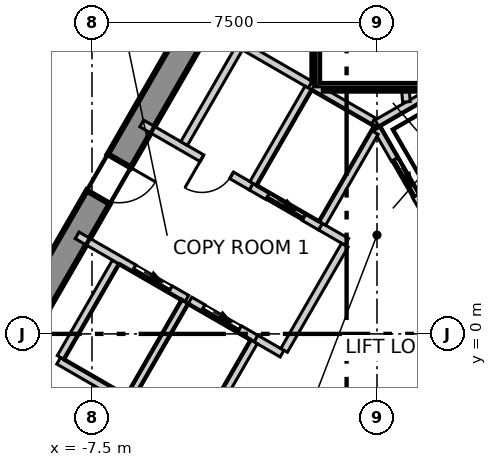
"""IFC4 building model, lengths in metres.
Left out: names, types, materials, properties, quantities, classifications, styles, units other than length and angle.
Written with IfcOpenShell. Run it as: python <this file> out.ifc"""

import sys

from ifc_helpers import new_model, si_unit, direction, frame, frame_2d, origin, place, context, subcontext, project, spatial, polyline, rectangle, outline, extrude, element, fill, save


model = new_model("IFC4")
c1 = context("Model", 3, precision=1e-05, world=origin(), true_north=direction((0.0, 1.0)))
c2 = subcontext(c1, "Body", "Model", "MODEL_VIEW")
j1 = project(units=[si_unit("LENGTHUNIT", "METRE"), si_unit("PLANEANGLEUNIT", "RADIAN")], contexts=[c1])
p1 = place(None, origin())
s1 = spatial("IfcSite", under=j1, at=p1, CompositionType="ELEMENT")
p2 = place(p1, origin())
s2 = spatial("IfcBuilding", under=s1, at=p2, CompositionType="ELEMENT")
p3 = place(p2, frame((0.0, 0.0, 215.3)))
s3 = spatial("IfcBuildingStorey", under=s2, at=p3, CompositionType="ELEMENT", Elevation=215.3)
p4 = place(p3, frame((-1.703, 13.35, -0.3), z_axis=(0.0, 0.0, 1.0), x_axis=(-0.500011533395, -0.866018744874, 0.0)))
e1 = element("IfcWall", 1, at=p4, inside=s3, PredefinedType="SHEAR", context=c2, shape_type="SweptSolid", body=[
    extrude(outline(polyline([(-0.202, -0.35), (1.782, -0.35), (3.766, -0.35), (5.75, -0.35), (7.734, -0.35), (9.718, -0.35), (11.702, -0.35), (13.686, -0.35), (15.67, -0.35), (17.654, -0.35), (19.638, -0.35), (21.622, -0.35), (21.218, 0.35), (19.307, 0.35), (17.397, 0.35), (15.486, 0.35), (13.576, 0.35), (11.665, 0.35), (9.755, 0.35), (7.844, 0.35), (5.934, 0.35), (4.023, 0.35), (2.113, 0.35), (0.202, 0.35), (-0.202, -0.35)])), origin(), (0.0, 0.0, 1.0), 4.0),
])
p5 = place(p4, frame((10.16, 0.0, 0.3)))
e2 = element("IfcOpeningElement", 2, at=p5, cuts=e1, PredefinedType="OPENING", context=c2, shape_type="SweptSolid", body=[
    extrude(rectangle(XDim=1.1, YDim=2.1, at=frame_2d((0.55, 1.05))), frame((0.0, 0.36, 0.0), z_axis=(0.0, -1.0, 0.0), x_axis=(1.0, 0.0, 0.0)), (0.0, 0.0, 1.0), 0.72),
])
p6 = place(p4, frame((16.465, 0.0, 0.3)))
e3 = element("IfcOpeningElement", 3, at=p6, cuts=e1, PredefinedType="OPENING", context=c2, shape_type="SweptSolid", body=[
    extrude(rectangle(XDim=0.9, YDim=2.1, at=frame_2d((0.45, 1.05))), frame((0.0, 0.36, 0.0), z_axis=(0.0, -1.0, 0.0), x_axis=(1.0, 0.0, 0.0)), (0.0, 0.0, 1.0), 0.72),
])
p7 = place(p4, frame((4.005, 0.0, 0.3)))
e4 = element("IfcOpeningElement", 4, at=p7, cuts=e1, PredefinedType="OPENING", context=c2, shape_type="SweptSolid", body=[
    extrude(rectangle(XDim=1.0, YDim=2.1, at=frame_2d((0.5, 1.05))), frame((0.0, 0.36, 0.0), z_axis=(0.0, -1.0, 0.0), x_axis=(1.0, 0.0, 0.0)), (0.0, 0.0, 1.0), 0.72),
])
p8 = place(p3, frame((-2.778, 31.008, 0.0), z_axis=(0.0, 0.0, 1.0), x_axis=(-0.499999612413, -0.866025627558, 0.0)))
e5 = element("IfcWall", 5, at=p8, inside=s3, PredefinedType="ELEMENTEDWALL", context=c2, shape_type="SweptSolid", body=[
    extrude(rectangle(XDim=50.91, YDim=0.2, at=frame_2d((25.455, 0.0))), origin(), (0.0, 0.0, 1.0), 3.7),
])
p9 = place(p8, frame((2.223, 0.0, 0.9)))
e6 = element("IfcOpeningElement", 6, at=p9, cuts=e5, PredefinedType="OPENING", context=c2, shape_type="SweptSolid", body=[
    extrude(rectangle(XDim=4.2, YDim=2.5, at=frame_2d((2.1, 1.25))), frame((0.0, 0.11, 0.0), z_axis=(0.0, -1.0, 0.0), x_axis=(1.0, 0.0, 0.0)), (0.0, 0.0, 1.0), 0.22),
])
p10 = place(p8, frame((8.263, 0.0, 0.9)))
e7 = element("IfcOpeningElement", 7, at=p10, cuts=e5, PredefinedType="OPENING", context=c2, shape_type="SweptSolid", body=[
    extrude(rectangle(XDim=4.2, YDim=2.5, at=frame_2d((2.1, 1.25))), frame((0.0, 0.11, 0.0), z_axis=(0.0, -1.0, 0.0), x_axis=(1.0, 0.0, 0.0)), (0.0, 0.0, 1.0), 0.22),
])
p11 = place(p8, frame((14.304, 0.0, 0.9)))
e8 = element("IfcOpeningElement", 8, at=p11, cuts=e5, PredefinedType="OPENING", context=c2, shape_type="SweptSolid", body=[
    extrude(rectangle(XDim=4.2, YDim=2.5, at=frame_2d((2.1, 1.25))), frame((0.0, 0.11, 0.0), z_axis=(0.0, -1.0, 0.0), x_axis=(1.0, 0.0, 0.0)), (0.0, 0.0, 1.0), 0.22),
])
p12 = place(p8, frame((20.344, 0.0, 0.9)))
e9 = element("IfcOpeningElement", 9, at=p12, cuts=e5, PredefinedType="OPENING", context=c2, shape_type="SweptSolid", body=[
    extrude(rectangle(XDim=4.2, YDim=2.5, at=frame_2d((2.1, 1.25))), frame((0.0, 0.11, 0.0), z_axis=(0.0, -1.0, 0.0), x_axis=(1.0, 0.0, 0.0)), (0.0, 0.0, 1.0), 0.22),
])
p13 = place(p8, frame((26.385, 0.0, 0.9)))
e10 = element("IfcOpeningElement", 10, at=p13, cuts=e5, PredefinedType="OPENING", context=c2, shape_type="SweptSolid", body=[
    extrude(rectangle(XDim=4.2, YDim=2.5, at=frame_2d((2.1, 1.25))), frame((0.0, 0.11, 0.0), z_axis=(0.0, -1.0, 0.0), x_axis=(1.0, 0.0, 0.0)), (0.0, 0.0, 1.0), 0.22),
])
p14 = place(p8, frame((32.425, 0.0, 0.9)))
e11 = element("IfcOpeningElement", 11, at=p14, cuts=e5, PredefinedType="OPENING", context=c2, shape_type="SweptSolid", body=[
    extrude(rectangle(XDim=4.2, YDim=2.5, at=frame_2d((2.1, 1.25))), frame((0.0, 0.11, 0.0), z_axis=(0.0, -1.0, 0.0), x_axis=(1.0, 0.0, 0.0)), (0.0, 0.0, 1.0), 0.22),
])
p15 = place(p8, frame((38.466, 0.0, 0.9)))
e12 = element("IfcOpeningElement", 12, at=p15, cuts=e5, PredefinedType="OPENING", context=c2, shape_type="SweptSolid", body=[
    extrude(rectangle(XDim=4.2, YDim=2.5, at=frame_2d((2.1, 1.25))), frame((0.0, 0.11, 0.0), z_axis=(0.0, -1.0, 0.0), x_axis=(1.0, 0.0, 0.0)), (0.0, 0.0, 1.0), 0.22),
])
p16 = place(p8, frame((44.506, 0.0, 0.9)))
e13 = element("IfcOpeningElement", 13, at=p16, cuts=e5, PredefinedType="OPENING", context=c2, shape_type="SweptSolid", body=[
    extrude(rectangle(XDim=4.2, YDim=2.5, at=frame_2d((2.1, 1.25))), frame((0.0, 0.11, 0.0), z_axis=(0.0, -1.0, 0.0), x_axis=(1.0, 0.0, 0.0)), (0.0, 0.0, 1.0), 0.22),
])
p17 = place(p3, frame((-20.883, -11.97, 0.0), z_axis=(0.0, 0.0, 1.0), x_axis=(0.500006150555, 0.866021852731, 0.0)))
e14 = element("IfcWall", 14, at=p17, inside=s3, PredefinedType="PARTITIONING", context=c2, shape_type="SweptSolid", body=[
    extrude(rectangle(XDim=41.766, YDim=0.15, at=frame_2d((20.883, 0.0))), origin(), (0.0, 0.0, 1.0), 3.7),
])
p18 = place(p17, frame((36.816, 0.0, 0.0)))
e15 = element("IfcOpeningElement", 15, at=p18, cuts=e14, PredefinedType="OPENING", context=c2, shape_type="SweptSolid", body=[
    extrude(rectangle(XDim=1.1, YDim=2.1, at=frame_2d((0.55, 1.05))), frame((0.0, 0.085, 0.0), z_axis=(0.0, -1.0, 0.0), x_axis=(1.0, 0.0, 0.0)), (0.0, 0.0, 1.0), 0.17),
])
p19 = place(p17, frame((23.939, 0.0, 0.0)))
e16 = element("IfcOpeningElement", 16, at=p19, cuts=e14, PredefinedType="OPENING", context=c2, shape_type="SweptSolid", body=[
    extrude(rectangle(XDim=1.1, YDim=2.1, at=frame_2d((0.55, 1.05))), frame((0.0, 0.085, 0.0), z_axis=(0.0, -1.0, 0.0), x_axis=(1.0, 0.0, 0.0)), (0.0, 0.0, 1.0), 0.17),
])
p20 = place(p17, frame((31.139, 0.0, 0.0)))
e17 = element("IfcOpeningElement", 17, at=p20, cuts=e14, PredefinedType="OPENING", context=c2, shape_type="SweptSolid", body=[
    extrude(rectangle(XDim=0.9, YDim=2.1, at=frame_2d((0.45, 1.05))), frame((0.0, 0.085, 0.0), z_axis=(0.0, -1.0, 0.0), x_axis=(1.0, 0.0, 0.0)), (0.0, 0.0, 1.0), 0.17),
])
p21 = place(p17, frame((28.739, 0.0, 0.0)))
e18 = element("IfcOpeningElement", 18, at=p21, cuts=e14, PredefinedType="OPENING", context=c2, shape_type="SweptSolid", body=[
    extrude(rectangle(XDim=0.9, YDim=2.1, at=frame_2d((0.45, 1.05))), frame((0.0, 0.085, 0.0), z_axis=(0.0, -1.0, 0.0), x_axis=(1.0, 0.0, 0.0)), (0.0, 0.0, 1.0), 0.17),
])
p22 = place(p17, frame((14.258, 0.0, 0.0)))
e19 = element("IfcOpeningElement", 19, at=p22, cuts=e14, PredefinedType="OPENING", context=c2, shape_type="SweptSolid", body=[
    extrude(rectangle(XDim=1.1, YDim=2.1, at=frame_2d((0.55, 1.05))), frame((0.0, 0.085, 0.0), z_axis=(0.0, -1.0, 0.0), x_axis=(1.0, 0.0, 0.0)), (0.0, 0.0, 1.0), 0.17),
])
p23 = place(p17, frame((3.777, 0.0, 0.0)))
e20 = element("IfcOpeningElement", 20, at=p23, cuts=e14, PredefinedType="OPENING", context=c2, shape_type="SweptSolid", body=[
    extrude(rectangle(XDim=1.1, YDim=2.1, at=frame_2d((0.55, 1.05))), frame((0.0, 0.085, 0.0), z_axis=(0.0, -1.0, 0.0), x_axis=(1.0, 0.0, 0.0)), (0.0, 0.0, 1.0), 0.17),
])
p24 = place(p3, frame((0.075, 24.07, 0.0), z_axis=(0.0, 0.0, 1.0), x_axis=(0.500006834213, -0.866021458014, 0.0)))
e21 = element("IfcWall", 21, at=p24, inside=s3, PredefinedType="PARTITIONING", context=c2, shape_type="SweptSolid", body=[
    extrude(rectangle(XDim=41.616, YDim=0.15, at=frame_2d((20.808, 0.0))), origin(), (0.0, 0.0, 1.0), 3.7),
])
p25 = place(p24, frame((33.715, 0.0, 0.0)))
e22 = element("IfcOpeningElement", 22, at=p25, cuts=e21, PredefinedType="OPENING", context=c2, shape_type="SweptSolid", body=[
    extrude(rectangle(XDim=1.1, YDim=2.1, at=frame_2d((0.55, 1.05))), frame((0.0, 0.085, 0.0), z_axis=(0.0, -1.0, 0.0), x_axis=(1.0, 0.0, 0.0)), (0.0, 0.0, 1.0), 0.17),
])
p26 = place(p24, frame((22.098, 0.0, 0.0)))
e23 = element("IfcOpeningElement", 23, at=p26, cuts=e21, PredefinedType="OPENING", context=c2, shape_type="SweptSolid", body=[
    extrude(rectangle(XDim=1.0, YDim=2.1, at=frame_2d((0.5, 1.05))), frame((0.0, 0.085, 0.0), z_axis=(0.0, -1.0, 0.0), x_axis=(1.0, 0.0, 0.0)), (0.0, 0.0, 1.0), 0.17),
])
p27 = place(p24, frame((25.198, 0.0, 0.0)))
e24 = element("IfcOpeningElement", 24, at=p27, cuts=e21, PredefinedType="OPENING", context=c2, shape_type="SweptSolid", body=[
    extrude(rectangle(XDim=0.9, YDim=2.1, at=frame_2d((0.45, 1.05))), frame((0.0, 0.085, 0.0), z_axis=(0.0, -1.0, 0.0), x_axis=(1.0, 0.0, 0.0)), (0.0, 0.0, 1.0), 0.17),
])
p28 = place(p24, frame((9.858, 0.0, 0.0)))
e25 = element("IfcOpeningElement", 25, at=p28, cuts=e21, PredefinedType="OPENING", context=c2, shape_type="SweptSolid", body=[
    extrude(rectangle(XDim=1.1, YDim=2.1, at=frame_2d((0.55, 1.05))), frame((0.0, 0.085, 0.0), z_axis=(0.0, -1.0, 0.0), x_axis=(1.0, 0.0, 0.0)), (0.0, 0.0, 1.0), 0.17),
])
p29 = place(p24, frame((18.758, 0.0, 0.0)))
e26 = element("IfcOpeningElement", 26, at=p29, cuts=e21, PredefinedType="OPENING", context=c2, shape_type="SweptSolid", body=[
    extrude(rectangle(XDim=0.9, YDim=2.1, at=frame_2d((0.45, 1.05))), frame((0.0, 0.085, 0.0), z_axis=(0.0, -1.0, 0.0), x_axis=(1.0, 0.0, 0.0)), (0.0, 0.0, 1.0), 0.17),
])
p30 = place(p24, frame((15.558, 0.0, 0.0)))
e27 = element("IfcOpeningElement", 27, at=p30, cuts=e21, PredefinedType="OPENING", context=c2, shape_type="SweptSolid", body=[
    extrude(rectangle(XDim=0.9, YDim=2.1, at=frame_2d((0.45, 1.05))), frame((0.0, 0.085, 0.0), z_axis=(0.0, -1.0, 0.0), x_axis=(1.0, 0.0, 0.0)), (0.0, 0.0, 1.0), 0.17),
])
p31 = place(p24, frame((12.658, 0.0, 0.0)))
e28 = element("IfcOpeningElement", 28, at=p31, cuts=e21, PredefinedType="OPENING", context=c2, shape_type="SweptSolid", body=[
    extrude(rectangle(XDim=1.0, YDim=2.1, at=frame_2d((0.5, 1.05))), frame((0.0, 0.085, 0.0), z_axis=(0.0, -1.0, 0.0), x_axis=(1.0, 0.0, 0.0)), (0.0, 0.0, 1.0), 0.17),
])
p32 = place(p24, frame((3.776, 0.0, 0.0)))
e29 = element("IfcOpeningElement", 29, at=p32, cuts=e21, PredefinedType="OPENING", context=c2, shape_type="SweptSolid", body=[
    extrude(rectangle(XDim=1.1, YDim=2.1, at=frame_2d((0.55, 1.05))), frame((0.0, 0.085, 0.0), z_axis=(0.0, -1.0, 0.0), x_axis=(1.0, 0.0, 0.0)), (0.0, 0.0, 1.0), 0.17),
])
p33 = place(p3, frame((-8.376, -0.707, 0.0), z_axis=(0.0, 0.0, 1.0), x_axis=(0.866067520717, -0.499927044236, 0.0)))
e30 = element("IfcWall", 30, at=p33, inside=s3, PredefinedType="SOLIDWALL", context=c2, shape_type="SweptSolid", body=[
    extrude(rectangle(XDim=2.1, YDim=0.2, at=frame_2d((1.05, 0.0))), origin(), (0.0, 0.0, 1.0), 3.7),
])
p34 = place(p3, frame((-8.326, -0.62, 0.0), z_axis=(0.0, 0.0, 1.0), x_axis=(0.500023687443, 0.866011727401, 0.0)))
e31 = element("IfcWall", 31, at=p34, inside=s3, PredefinedType="SOLIDWALL", context=c2, shape_type="SweptSolid", body=[
    extrude(rectangle(XDim=2.9, YDim=0.2, at=frame_2d((1.45, 0.0))), origin(), (0.0, 0.0, 1.0), 3.7),
])
p35 = place(p3, frame((-0.002, 5.541, 0.0), z_axis=(0.0, 0.0, 1.0), x_axis=(0.86600155993, 0.500041296494, 0.0)))
e32 = element("IfcWall", 32, at=p35, inside=s3, PredefinedType="SOLIDWALL", context=c2, shape_type="SweptSolid", body=[
    extrude(rectangle(XDim=4.132, YDim=0.2, at=frame_2d((2.066, 0.0))), origin(), (0.0, 0.0, 1.0), 3.7),
])
p36 = place(p3, frame((0.0, 5.4, 0.0), z_axis=(0.0, 0.0, 1.0), x_axis=(0.500103862429, -0.865965430478, 0.0)))
e33 = element("IfcWall", 33, at=p36, inside=s3, PredefinedType="SOLIDWALL", context=c2, shape_type="SweptSolid", body=[
    extrude(rectangle(XDim=2.973, YDim=0.2, at=frame_2d((1.487, 0.0))), origin(), (0.0, 0.0, 1.0), 3.7),
])
p37 = place(p36, frame((0.937, 0.0, 0.0)))
e34 = element("IfcOpeningElement", 34, at=p37, cuts=e33, PredefinedType="OPENING", context=c2, shape_type="SweptSolid", body=[
    extrude(rectangle(XDim=1.1, YDim=2.1, at=frame_2d((0.55, 1.05))), frame((0.0, 0.11, 0.0), z_axis=(0.0, -1.0, 0.0), x_axis=(1.0, 0.0, 0.0)), (0.0, 0.0, 1.0), 0.22),
])
p38 = place(p3, frame((-7.891, 2.593, 0.0), z_axis=(0.0, 0.0, 1.0), x_axis=(0.866070917804, -0.499921159118, 0.0)))
e35 = element("IfcWall", 35, at=p38, inside=s3, PredefinedType="SOLIDWALL", context=c2, shape_type="SweptSolid", body=[
    extrude(rectangle(XDim=3.333, YDim=0.2, at=frame_2d((1.666, 0.0))), origin(), (0.0, 0.0, 1.0), 3.7),
])
p39 = place(p38, frame((1.73, 0.0, 0.0)))
e36 = element("IfcOpeningElement", 36, at=p39, cuts=e35, PredefinedType="OPENING", context=c2, shape_type="SweptSolid", body=[
    extrude(rectangle(XDim=1.1, YDim=2.1, at=frame_2d((0.55, 1.05))), frame((0.0, 0.11, 0.0), z_axis=(0.0, -1.0, 0.0), x_axis=(1.0, 0.0, 0.0)), (0.0, 0.0, 1.0), 0.22),
])
p40 = place(p3, frame((-3.188, -0.122, 0.0), z_axis=(0.0, 0.0, 1.0), x_axis=(0.865705793592, -0.50055317294, 0.0)))
e37 = element("IfcWall", 37, at=p40, inside=s3, PredefinedType="SOLIDWALL", context=c2, shape_type="SweptSolid", body=[
    extrude(rectangle(XDim=0.797, YDim=0.2, at=frame_2d((0.398, 0.0))), origin(), (0.0, 0.0, 1.0), 3.7),
])
p41 = place(p3, frame((-6.191, 5.537, 0.0), z_axis=(0.0, 0.0, 1.0), x_axis=(0.866052607023, -0.499952879648, 0.0)))
e38 = element("IfcWall", 38, at=p41, inside=s3, PredefinedType="SOLIDWALL", context=c2, shape_type="SweptSolid", body=[
    extrude(rectangle(XDim=3.332, YDim=0.2, at=frame_2d((1.666, 0.0))), origin(), (0.0, 0.0, 1.0), 3.7),
])
p42 = place(p41, frame((1.83, 0.0, 0.0)))
e39 = element("IfcOpeningElement", 39, at=p42, cuts=e38, PredefinedType="OPENING", context=c2, shape_type="SweptSolid", body=[
    extrude(rectangle(XDim=0.9, YDim=2.1, at=frame_2d((0.45, 1.05))), frame((0.0, 0.11, 0.0), z_axis=(0.0, -1.0, 0.0), x_axis=(1.0, 0.0, 0.0)), (0.0, 0.0, 1.0), 0.22),
])
p43 = place(p3, frame((-1.488, 2.822, 0.0), z_axis=(0.0, 0.0, 1.0), x_axis=(0.866236612152, -0.499633997809, 0.0)))
e40 = element("IfcWall", 40, at=p43, inside=s3, PredefinedType="SOLIDWALL", context=c2, shape_type="SweptSolid", body=[
    extrude(rectangle(XDim=0.796, YDim=0.2, at=frame_2d((0.398, 0.0))), origin(), (0.0, 0.0, 1.0), 3.7),
])
p44 = place(p3, frame((-5.076, 5.009, 0.0), z_axis=(0.0, 0.0, 1.0), x_axis=(0.50002537861, 0.866010750942, 0.0)))
e41 = element("IfcWall", 41, at=p44, inside=s3, PredefinedType="SOLIDWALL", context=c2, shape_type="SweptSolid", body=[
    extrude(rectangle(XDim=3.0, YDim=0.2, at=frame_2d((1.5, 0.0))), origin(), (0.0, 0.0, 1.0), 3.7),
])
p45 = place(p3, frame((-3.489, 7.557, 0.0), z_axis=(0.0, 0.0, 1.0), x_axis=(0.866010750942, -0.50002537861, 0.0)))
e42 = element("IfcWall", 42, at=p45, inside=s3, PredefinedType="SOLIDWALL", context=c2, shape_type="SweptSolid", body=[
    extrude(rectangle(XDim=2.0, YDim=0.2, at=frame_2d((1.0, 0.0))), origin(), (0.0, 0.0, 1.0), 3.7),
])
p46 = place(p3, frame((-2.444, -0.433, 0.0), z_axis=(0.0, 0.0, 1.0), x_axis=(0.500035624827, 0.866004834804, 0.0)))
e43 = element("IfcWall", 43, at=p46, inside=s3, PredefinedType="SOLIDWALL", context=c2, shape_type="SweptSolid", body=[
    extrude(rectangle(XDim=3.194, YDim=0.2, at=frame_2d((1.597, 0.0))), origin(), (0.0, 0.0, 1.0), 3.7),
])
p47 = place(p3, frame((-6.507, -1.67, 0.0), z_axis=(0.0, 0.0, 1.0), x_axis=(0.50012328804, 0.865954211699, 0.0)))
e44 = element("IfcWall", 44, at=p47, inside=s3, PredefinedType="SOLIDWALL", context=c2, shape_type="SweptSolid", body=[
    extrude(rectangle(XDim=2.9, YDim=0.2, at=frame_2d((1.45, 0.0))), origin(), (0.0, 0.0, 1.0), 3.7),
])
p48 = place(p3, frame((-4.922, 0.879, 0.0), z_axis=(0.0, 0.0, 1.0), x_axis=(0.866073918653, -0.499915960366, 0.0)))
e45 = element("IfcWall", 45, at=p48, inside=s3, PredefinedType="SOLIDWALL", context=c2, shape_type="SweptSolid", body=[
    extrude(rectangle(XDim=2.002, YDim=0.2, at=frame_2d((1.001, 0.0))), origin(), (0.0, 0.0, 1.0), 3.7),
])
p49 = place(p48, frame((0.402, 0.0, 0.0)))
e46 = element("IfcOpeningElement", 46, at=p49, cuts=e45, PredefinedType="OPENING", context=c2, shape_type="SweptSolid", body=[
    extrude(rectangle(XDim=1.1, YDim=2.1, at=frame_2d((0.55, 1.05))), frame((0.0, 0.11, 0.0), z_axis=(0.0, -1.0, 0.0), x_axis=(1.0, 0.0, 0.0)), (0.0, 0.0, 1.0), 0.22),
])
p50 = place(p3, frame((-4.619, -2.6, 0.0), z_axis=(0.0, 0.0, 1.0), x_axis=(0.50009492287, 0.865970593103, 0.0)))
e47 = element("IfcWall", 47, at=p50, inside=s3, PredefinedType="SOLIDWALL", context=c2, shape_type="SweptSolid", body=[
    extrude(rectangle(XDim=2.761, YDim=0.2, at=frame_2d((1.381, 0.0))), origin(), (0.0, 0.0, 1.0), 3.7),
])
p51 = place(p3, frame((-3.309, 3.873, 0.0), z_axis=(0.0, 0.0, 1.0), x_axis=(0.866098583652, -0.499873227325, 0.0)))
e48 = element("IfcWall", 48, at=p51, inside=s3, PredefinedType="SOLIDWALL", context=c2, shape_type="SweptSolid", body=[
    extrude(rectangle(XDim=2.103, YDim=0.2, at=frame_2d((1.051, 0.0))), origin(), (0.0, 0.0, 1.0), 3.7),
])
p52 = place(p51, frame((0.502, 0.0, 0.0)))
e49 = element("IfcOpeningElement", 49, at=p52, cuts=e48, PredefinedType="OPENING", context=c2, shape_type="SweptSolid", body=[
    extrude(rectangle(XDim=1.1, YDim=2.1, at=frame_2d((0.55, 1.05))), frame((0.0, 0.11, 0.0), z_axis=(0.0, -1.0, 0.0), x_axis=(1.0, 0.0, 0.0)), (0.0, 0.0, 1.0), 0.22),
])
p53 = place(p3, frame((-3.257, 3.959, 0.0), z_axis=(0.0, 0.0, 1.0), x_axis=(0.50012328804, 0.865954211699, 0.0)))
e50 = element("IfcWall", 50, at=p53, inside=s3, PredefinedType="SOLIDWALL", context=c2, shape_type="SweptSolid", body=[
    extrude(rectangle(XDim=2.9, YDim=0.2, at=frame_2d((1.45, 0.0))), origin(), (0.0, 0.0, 1.0), 3.7),
])
p54 = place(p3, frame((-1.67, 6.507, 0.0), z_axis=(0.0, 0.0, 1.0), x_axis=(0.865941441609, -0.500145398563, 0.0)))
e51 = element("IfcWall", 51, at=p54, inside=s3, PredefinedType="SOLIDWALL", context=c2, shape_type="SweptSolid", body=[
    extrude(rectangle(XDim=1.815, YDim=0.2, at=frame_2d((0.908, 0.0))), origin(), (0.0, 0.0, 1.0), 3.7),
])
p55 = place(p3, frame((-1.438, 2.909, 0.0), z_axis=(0.0, 0.0, 1.0), x_axis=(0.499829630636, 0.866123744241, 0.0)))
e52 = element("IfcWall", 52, at=p55, inside=s3, PredefinedType="SOLIDWALL", context=c2, shape_type="SweptSolid", body=[
    extrude(rectangle(XDim=2.761, YDim=0.2, at=frame_2d((1.38, 0.0))), origin(), (0.0, 0.0, 1.0), 3.7),
])
p56 = place(p3, frame((0.75, 6.4, 0.0), z_axis=(0.0, 0.0, 1.0), x_axis=(0.080860177601, -0.996725454515, 0.0)))
e53 = element("IfcWall", 53, at=p56, inside=s3, PredefinedType="SOLIDWALL", context=c2, shape_type="SweptSolid", body=[
    extrude(rectangle(XDim=0.296, YDim=0.2, at=frame_2d((0.148, 0.0))), origin(), (0.0, 0.0, 1.0), 3.7),
])
p57 = place(p3, frame((-1.4, 6.5, 0.0), z_axis=(0.0, 0.0, 1.0), x_axis=(1.0, 0.0, 0.0)))
e54 = element("IfcWall", 54, at=p57, inside=s3, PredefinedType="SOLIDWALL", context=c2, shape_type="SweptSolid", body=[
    extrude(rectangle(XDim=2.8, YDim=0.2, at=frame_2d((1.4, 0.0))), origin(), (0.0, 0.0, 1.0), 3.7),
])
p58 = place(p3, frame((-1.6, 6.615, 0.0), z_axis=(0.0, 0.0, 1.0), x_axis=(0.0, 1.0, 0.0)))
e55 = element("IfcWall", 55, at=p58, inside=s3, PredefinedType="SOLIDWALL", context=c2, shape_type="SweptSolid", body=[
    extrude(rectangle(XDim=6.715, YDim=0.2, at=frame_2d((3.357, 0.0))), origin(), (0.0, 0.0, 1.0), 3.7),
])
p59 = place(p37, origin())
e56 = element("IfcDoor", 56, at=p59, inside=s3, OperationType="SLIDING_TO_LEFT", PredefinedType="DOOR", context=c2, shape_type="SweptSolid", body=[
    extrude(rectangle(XDim=1.1, YDim=2.1, at=frame_2d((0.55, 1.05))), frame((0.0, 0.025, 0.0), z_axis=(0.0, -1.0, 0.0), x_axis=(1.0, 0.0, 0.0)), (0.0, 0.0, 1.0), 0.05),
])
fill(e34, e56)
p60 = place(p49, origin())
e57 = element("IfcDoor", 57, at=p60, inside=s3, OperationType="SLIDING_TO_LEFT", PredefinedType="DOOR", context=c2, shape_type="SweptSolid", body=[
    extrude(rectangle(XDim=1.1, YDim=2.1, at=frame_2d((0.55, 1.05))), frame((0.0, 0.025, 0.0), z_axis=(0.0, -1.0, 0.0), x_axis=(1.0, 0.0, 0.0)), (0.0, 0.0, 1.0), 0.05),
])
fill(e46, e57)
p61 = place(p52, origin())
e58 = element("IfcDoor", 58, at=p61, inside=s3, OperationType="SLIDING_TO_LEFT", PredefinedType="DOOR", context=c2, shape_type="SweptSolid", body=[
    extrude(rectangle(XDim=1.1, YDim=2.1, at=frame_2d((0.55, 1.05))), frame((0.0, 0.025, 0.0), z_axis=(0.0, -1.0, 0.0), x_axis=(1.0, 0.0, 0.0)), (0.0, 0.0, 1.0), 0.05),
])
fill(e49, e58)
p62 = place(p39, origin())
e59 = element("IfcDoor", 59, at=p62, inside=s3, OperationType="SLIDING_TO_LEFT", PredefinedType="DOOR", context=c2, shape_type="SweptSolid", body=[
    extrude(rectangle(XDim=1.1, YDim=2.1, at=frame_2d((0.55, 1.05))), frame((0.0, 0.025, 0.0), z_axis=(0.0, -1.0, 0.0), x_axis=(1.0, 0.0, 0.0)), (0.0, 0.0, 1.0), 0.05),
])
fill(e36, e59)
p63 = place(p42, origin())
e60 = element("IfcDoor", 60, at=p63, inside=s3, OperationType="SINGLE_SWING_LEFT", PredefinedType="DOOR", context=c2, shape_type="SweptSolid", body=[
    extrude(rectangle(XDim=0.9, YDim=2.1, at=frame_2d((0.45, 1.05))), frame((0.0, 0.025, 0.0), z_axis=(0.0, -1.0, 0.0), x_axis=(1.0, 0.0, 0.0)), (0.0, 0.0, 1.0), 0.05),
])
fill(e39, e60)
p64 = place(p5, origin())
e61 = element("IfcDoor", 61, at=p64, inside=s3, OperationType="SINGLE_SWING_RIGHT", PredefinedType="DOOR", context=c2, shape_type="SweptSolid", body=[
    extrude(rectangle(XDim=1.1, YDim=2.1, at=frame_2d((0.55, 1.05))), frame((0.0, 0.025, 0.0), z_axis=(0.0, -1.0, 0.0), x_axis=(1.0, 0.0, 0.0)), (0.0, 0.0, 1.0), 0.05),
])
fill(e2, e61)
save(model, sys.argv[1])
